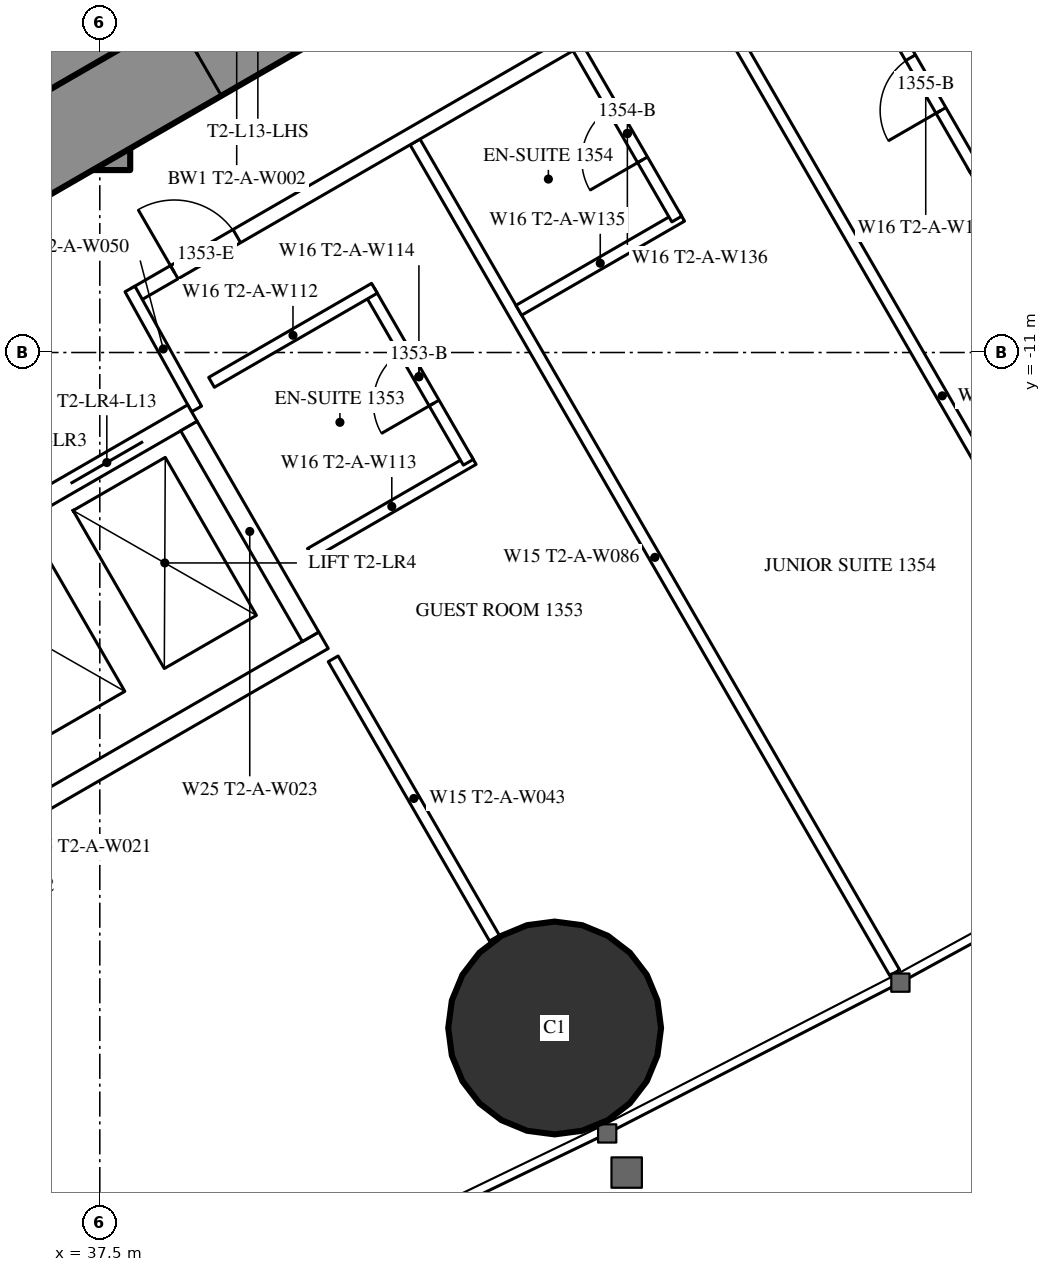
"""IFC4 building model, lengths in metres.
Left out: names, types, materials, properties, quantities, classifications, styles, units other than length and angle.
Written with IfcOpenShell. Run it as: python <this file> out.ifc"""

import sys

from ifc_helpers import new_model, si_unit, direction, frame, frame_2d, origin, origin_2d, place, context, subcontext, project, spatial, rectangle, hollow_circle, extrude, element, fill, save


model = new_model("IFC4")
c1 = context("Model", 3, precision=1e-05, world=origin(), true_north=direction((0.0, 1.0)))
c2 = subcontext(c1, "Body", "Model", "MODEL_VIEW")
j1 = project(units=[si_unit("LENGTHUNIT", "METRE"), si_unit("PLANEANGLEUNIT", "RADIAN")], contexts=[c1])
p1 = place(None, origin())
s1 = spatial("IfcSite", under=j1, at=p1, CompositionType="ELEMENT")
p2 = place(p1, origin())
s2 = spatial("IfcBuilding", under=s1, at=p2, CompositionType="ELEMENT")
p3 = place(p2, frame((0.0, 0.0, 53.0)))
s3 = spatial("IfcBuildingStorey", under=s2, at=p3, CompositionType="ELEMENT", Elevation=53.0)
p4 = place(p3, frame((43.484, -19.886, 0.0), z_axis=(0.0, 0.0, 1.0), x_axis=(1.0, 0.0, 0.0)))
e1 = element("IfcColumn", 1, at=p4, inside=s3, PredefinedType="COLUMN", context=c2, shape_type="SweptSolid", body=[
    extrude(hollow_circle(Radius=1.4, WallThickness=0.12, at=origin_2d()), origin(), (0.0, 0.0, 1.0), 3.5),
])
p5 = place(p3, frame((37.3, -8.6, 0.0), z_axis=(0.0, 0.0, 1.0), x_axis=(0.0, 1.0, 0.0)))
e2 = element("IfcWall", 2, at=p5, inside=s3, PredefinedType="SHEAR", context=c2, shape_type="SweptSolid", body=[
    extrude(rectangle(XDim=17.2, YDim=1.2, at=frame_2d((8.6, 0.0))), origin(), (0.0, 0.0, 1.0), 3.5),
])
p6 = place(p5, frame((7.7, 0.0, 0.0)))
e3 = element("IfcOpeningElement", 3, at=p6, cuts=e2, PredefinedType="OPENING", context=c2, shape_type="SweptSolid", body=[
    extrude(rectangle(XDim=1.8, YDim=2.2, at=frame_2d((0.9, 1.1))), frame((0.0, 0.61, 0.0), z_axis=(0.0, -1.0, 0.0), x_axis=(1.0, 0.0, 0.0)), (0.0, 0.0, 1.0), 1.22),
])
p7 = place(p3, frame((27.2, -13.8, 0.0), z_axis=(0.0, 0.0, 1.0), x_axis=(0.866027159892, 0.499996958321, 0.0)))
e4 = element("IfcWall", 4, at=p7, inside=s3, PredefinedType="SHEAR", context=c2, shape_type="SweptSolid", body=[
    extrude(rectangle(XDim=27.947, YDim=1.2, at=frame_2d((13.973, 0.0))), origin(), (0.0, 0.0, 1.0), 3.5),
])
p8 = place(p7, frame((4.6, 0.0, 0.0)))
e5 = element("IfcOpeningElement", 5, at=p8, cuts=e4, PredefinedType="OPENING", context=c2, shape_type="SweptSolid", body=[
    extrude(rectangle(XDim=1.0, YDim=2.2, at=frame_2d((0.5, 1.1))), frame((0.0, 0.61, 0.0), z_axis=(0.0, -1.0, 0.0), x_axis=(1.0, 0.0, 0.0)), (0.0, 0.0, 1.0), 1.22),
])
p9 = place(p7, frame((13.395, 0.0, 0.0)))
e6 = element("IfcOpeningElement", 6, at=p9, cuts=e4, PredefinedType="OPENING", context=c2, shape_type="SweptSolid", body=[
    extrude(rectangle(XDim=1.8, YDim=2.2, at=frame_2d((0.9, 1.1))), frame((0.0, 0.61, 0.0), z_axis=(0.0, -1.0, 0.0), x_axis=(1.0, 0.0, 0.0)), (0.0, 0.0, 1.0), 1.22),
])
p10 = place(p3, frame((41.647, -8.23, 0.0), z_axis=(0.0, 0.0, 1.0), x_axis=(0.49998590462, -0.866033541603, 0.0)))
e7 = element("IfcWall", 7, at=p10, inside=s3, PredefinedType="PARTITIONING", context=c2, shape_type="SweptSolid", body=[
    extrude(rectangle(XDim=12.621, YDim=0.15, at=frame_2d((6.311, 0.0))), origin(), (0.0, 0.0, 1.0), 3.25),
])
p11 = place(p3, frame((45.403, -6.062, 0.0), z_axis=(0.0, 0.0, 1.0), x_axis=(0.500007077968, -0.866021317279, 0.0)))
e8 = element("IfcWall", 8, at=p11, inside=s3, PredefinedType="PARTITIONING", context=c2, shape_type="SweptSolid", body=[
    extrude(rectangle(XDim=12.721, YDim=0.15, at=frame_2d((6.361, 0.0))), origin(), (0.0, 0.0, 1.0), 3.25),
])
p12 = place(p3, frame((40.57, -15.03, 0.0), z_axis=(0.0, 0.0, 1.0), x_axis=(0.500012993597, -0.866017901798, 0.0)))
e9 = element("IfcWall", 9, at=p12, inside=s3, PredefinedType="PARTITIONING", context=c2, shape_type="SweptSolid", body=[
    extrude(rectangle(XDim=4.243, YDim=0.15, at=frame_2d((2.122, 0.0))), origin(), (0.0, 0.0, 1.0), 3.25),
])
p13 = place(p3, frame((37.96, -10.243, 0.0), z_axis=(0.0, 0.0, 1.0), x_axis=(0.866026429433, 0.499998223521, 0.0)))
e10 = element("IfcWall", 10, at=p13, inside=s3, PredefinedType="PARTITIONING", context=c2, shape_type="SweptSolid", body=[
    extrude(rectangle(XDim=20.487, YDim=0.2, at=frame_2d((10.243, 0.0))), origin(), (0.0, 0.0, 1.0), 3.25),
])
p14 = place(p13, frame((6.925, 0.0, 0.0)))
e11 = element("IfcOpeningElement", 11, at=p14, cuts=e10, PredefinedType="OPENING", context=c2, shape_type="SweptSolid", body=[
    extrude(rectangle(XDim=0.95, YDim=2.2, at=frame_2d((0.475, 1.1))), frame((0.0, 0.11, 0.0), z_axis=(0.0, -1.0, 0.0), x_axis=(1.0, 0.0, 0.0)), (0.0, 0.0, 1.0), 0.22),
])
p15 = place(p13, frame((11.549, 0.0, 0.0)))
e12 = element("IfcOpeningElement", 12, at=p15, cuts=e10, PredefinedType="OPENING", context=c2, shape_type="SweptSolid", body=[
    extrude(rectangle(XDim=0.95, YDim=2.2, at=frame_2d((0.475, 1.1))), frame((0.0, 0.11, 0.0), z_axis=(0.0, -1.0, 0.0), x_axis=(1.0, 0.0, 0.0)), (0.0, 0.0, 1.0), 0.22),
])
p16 = place(p13, frame((13.249, 0.0, 0.0)))
e13 = element("IfcOpeningElement", 13, at=p16, cuts=e10, PredefinedType="OPENING", context=c2, shape_type="SweptSolid", body=[
    extrude(rectangle(XDim=0.95, YDim=2.2, at=frame_2d((0.475, 1.1))), frame((0.0, 0.11, 0.0), z_axis=(0.0, -1.0, 0.0), x_axis=(1.0, 0.0, 0.0)), (0.0, 0.0, 1.0), 0.22),
])
p17 = place(p13, frame((17.585, 0.0, 0.0)))
e14 = element("IfcOpeningElement", 14, at=p17, cuts=e10, PredefinedType="OPENING", context=c2, shape_type="SweptSolid", body=[
    extrude(rectangle(XDim=0.95, YDim=2.2, at=frame_2d((0.475, 1.1))), frame((0.0, 0.11, 0.0), z_axis=(0.0, -1.0, 0.0), x_axis=(1.0, 0.0, 0.0)), (0.0, 0.0, 1.0), 0.22),
])
p18 = place(p13, frame((0.6, 0.0, 0.0)))
e15 = element("IfcOpeningElement", 15, at=p18, cuts=e10, PredefinedType="OPENING", context=c2, shape_type="SweptSolid", body=[
    extrude(rectangle(XDim=0.95, YDim=2.2, at=frame_2d((0.475, 1.1))), frame((0.0, 0.11, 0.0), z_axis=(0.0, -1.0, 0.0), x_axis=(1.0, 0.0, 0.0)), (0.0, 0.0, 1.0), 0.22),
])
p19 = place(p3, frame((38.773, -11.742, 0.0), z_axis=(0.0, 0.0, 1.0), x_axis=(-0.485528096672, 0.8742210632, 0.0)))
e16 = element("IfcWall", 16, at=p19, inside=s3, PredefinedType="PARTITIONING", context=c2, shape_type="SweptSolid", body=[
    extrude(rectangle(XDim=1.805, YDim=0.15, at=frame_2d((0.903, 0.0))), origin(), (0.0, 0.0, 1.0), 3.25),
])
p20 = place(p3, frame((43.012, -10.444, 0.0), z_axis=(0.0, 0.0, 1.0), x_axis=(0.866031185235, 0.4999899861, 0.0)))
e17 = element("IfcWall", 17, at=p20, inside=s3, PredefinedType="PARTITIONING", context=c2, shape_type="SweptSolid", body=[
    extrude(rectangle(XDim=2.475, YDim=0.15, at=frame_2d((1.238, 0.0))), origin(), (0.0, 0.0, 1.0), 3.25),
])
p21 = place(p3, frame((43.791, -6.993, 0.0), z_axis=(0.0, 0.0, 1.0), x_axis=(0.500047596559, -0.865997922154, 0.0)))
e18 = element("IfcWall", 18, at=p21, inside=s3, PredefinedType="PARTITIONING", context=c2, shape_type="SweptSolid", body=[
    extrude(rectangle(XDim=2.6, YDim=0.15, at=frame_2d((1.3, 0.0))), origin(), (0.0, 0.0, 1.0), 3.25),
])
p22 = place(p21, frame((0.9, 0.0, 0.0)))
e19 = element("IfcOpeningElement", 19, at=p22, cuts=e18, PredefinedType="OPENING", context=c2, shape_type="SweptSolid", body=[
    extrude(rectangle(XDim=0.8, YDim=2.2, at=frame_2d((0.4, 1.1))), frame((0.0, 0.085, 0.0), z_axis=(0.0, -1.0, 0.0), x_axis=(1.0, 0.0, 0.0)), (0.0, 0.0, 1.0), 0.17),
])
p23 = place(p3, frame((48.951, -8.632, 0.0), z_axis=(0.0, 0.0, 1.0), x_axis=(0.866006523861, 0.500032699561, 0.0)))
e20 = element("IfcWall", 20, at=p23, inside=s3, PredefinedType="PARTITIONING", context=c2, shape_type="SweptSolid", body=[
    extrude(rectangle(XDim=2.475, YDim=0.15, at=frame_2d((1.237, 0.0))), origin(), (0.0, 0.0, 1.0), 3.25),
])
p24 = place(p3, frame((47.716, -6.343, 0.0), z_axis=(0.0, 0.0, 1.0), x_axis=(0.500006934395, -0.866021400173, 0.0)))
e21 = element("IfcWall", 21, at=p24, inside=s3, PredefinedType="PARTITIONING", context=c2, shape_type="SweptSolid", body=[
    extrude(rectangle(XDim=2.6, YDim=0.15, at=frame_2d((1.3, 0.0))), origin(), (0.0, 0.0, 1.0), 3.25),
])
p25 = place(p24, frame((0.9, 0.0, 0.0)))
e22 = element("IfcOpeningElement", 22, at=p25, cuts=e21, PredefinedType="OPENING", context=c2, shape_type="SweptSolid", body=[
    extrude(rectangle(XDim=0.8, YDim=2.2, at=frame_2d((0.4, 1.1))), frame((0.0, 0.085, 0.0), z_axis=(0.0, -1.0, 0.0), x_axis=(1.0, 0.0, 0.0)), (0.0, 0.0, 1.0), 0.17),
])
p26 = place(p3, frame((40.27, -13.644, 0.0), z_axis=(0.0, 0.0, 1.0), x_axis=(0.866031185235, 0.4999899861, 0.0)))
e23 = element("IfcWall", 23, at=p26, inside=s3, PredefinedType="PARTITIONING", context=c2, shape_type="SweptSolid", body=[
    extrude(rectangle(XDim=2.475, YDim=0.15, at=frame_2d((1.238, 0.0))), origin(), (0.0, 0.0, 1.0), 3.25),
])
p27 = place(p3, frame((41.048, -10.193, 0.0), z_axis=(0.0, 0.0, 1.0), x_axis=(0.500047596559, -0.865997922154, 0.0)))
e24 = element("IfcWall", 24, at=p27, inside=s3, PredefinedType="PARTITIONING", context=c2, shape_type="SweptSolid", body=[
    extrude(rectangle(XDim=2.6, YDim=0.15, at=frame_2d((1.3, 0.0))), origin(), (0.0, 0.0, 1.0), 3.25),
])
p28 = place(p27, frame((0.9, 0.0, 0.0)))
e25 = element("IfcOpeningElement", 25, at=p28, cuts=e24, PredefinedType="OPENING", context=c2, shape_type="SweptSolid", body=[
    extrude(rectangle(XDim=0.8, YDim=2.2, at=frame_2d((0.4, 1.1))), frame((0.0, 0.085, 0.0), z_axis=(0.0, -1.0, 0.0), x_axis=(1.0, 0.0, 0.0)), (0.0, 0.0, 1.0), 0.17),
])
p29 = place(p3, frame((38.97, -11.393, 0.0), z_axis=(0.0, 0.0, 1.0), x_axis=(0.866031185235, 0.4999899861, 0.0)))
e26 = element("IfcWall", 26, at=p29, inside=s3, PredefinedType="PARTITIONING", context=c2, shape_type="SweptSolid", body=[
    extrude(rectangle(XDim=2.475, YDim=0.15, at=frame_2d((1.238, 0.0))), origin(), (0.0, 0.0, 1.0), 3.25),
])
p30 = place(p3, frame((31.271, -16.097, 0.0), z_axis=(0.0, 0.0, 1.0), x_axis=(0.86604045752, 0.499973925258, 0.0)))
e27 = element("IfcWall", 27, at=p30, inside=s3, PredefinedType="PARTITIONING", context=c2, shape_type="SweptSolid", body=[
    extrude(rectangle(XDim=8.6, YDim=0.25, at=frame_2d((4.3, 0.0))), origin(), (0.0, 0.0, 1.0), 3.25),
])
p31 = place(p30, frame((0.75, 0.0, 0.0)))
e28 = element("IfcOpeningElement", 28, at=p31, cuts=e27, PredefinedType="OPENING", context=c2, shape_type="SweptSolid", body=[
    extrude(rectangle(XDim=1.1, YDim=2.2, at=frame_2d((0.55, 1.1))), frame((0.0, 0.135, 0.0), z_axis=(0.0, -1.0, 0.0), x_axis=(1.0, 0.0, 0.0)), (0.0, 0.0, 1.0), 0.27),
])
p32 = place(p30, frame((2.75, 0.0, 0.0)))
e29 = element("IfcOpeningElement", 29, at=p32, cuts=e27, PredefinedType="OPENING", context=c2, shape_type="SweptSolid", body=[
    extrude(rectangle(XDim=1.1, YDim=2.2, at=frame_2d((0.55, 1.1))), frame((0.0, 0.135, 0.0), z_axis=(0.0, -1.0, 0.0), x_axis=(1.0, 0.0, 0.0)), (0.0, 0.0, 1.0), 0.27),
])
p33 = place(p30, frame((4.75, 0.0, 0.0)))
e30 = element("IfcOpeningElement", 30, at=p33, cuts=e27, PredefinedType="OPENING", context=c2, shape_type="SweptSolid", body=[
    extrude(rectangle(XDim=1.1, YDim=2.2, at=frame_2d((0.55, 1.1))), frame((0.0, 0.135, 0.0), z_axis=(0.0, -1.0, 0.0), x_axis=(1.0, 0.0, 0.0)), (0.0, 0.0, 1.0), 0.27),
])
p34 = place(p30, frame((6.75, 0.0, 0.0)))
e31 = element("IfcOpeningElement", 31, at=p34, cuts=e27, PredefinedType="OPENING", context=c2, shape_type="SweptSolid", body=[
    extrude(rectangle(XDim=1.1, YDim=2.2, at=frame_2d((0.55, 1.1))), frame((0.0, 0.135, 0.0), z_axis=(0.0, -1.0, 0.0), x_axis=(1.0, 0.0, 0.0)), (0.0, 0.0, 1.0), 0.27),
])
p35 = place(p3, frame((32.996, -19.086, 0.0), z_axis=(0.0, 0.0, 1.0), x_axis=(0.866028165386, 0.499995216735, 0.0)))
e32 = element("IfcWall", 32, at=p35, inside=s3, PredefinedType="PARTITIONING", context=c2, shape_type="SweptSolid", body=[
    extrude(rectangle(XDim=8.6, YDim=0.25, at=frame_2d((4.3, 0.0))), origin(), (0.0, 0.0, 1.0), 3.25),
])
p36 = place(p3, frame((38.673, -11.968, 0.0), z_axis=(0.0, 0.0, 1.0), x_axis=(0.499929347863, -0.866066190972, 0.0)))
e33 = element("IfcWall", 33, at=p36, inside=s3, PredefinedType="PARTITIONING", context=c2, shape_type="SweptSolid", body=[
    extrude(rectangle(XDim=3.201, YDim=0.25, at=frame_2d((1.6, 0.0))), origin(), (0.0, 0.0, 1.0), 3.25),
])
p37 = place(p22, origin())
e34 = element("IfcDoor", 34, at=p37, inside=s3, OperationType="SINGLE_SWING_RIGHT", PredefinedType="DOOR", context=c2, shape_type="SweptSolid", body=[
    extrude(rectangle(XDim=0.8, YDim=2.2, at=frame_2d((0.4, 1.1))), frame((0.0, 0.025, 0.0), z_axis=(0.0, -1.0, 0.0), x_axis=(1.0, 0.0, 0.0)), (0.0, 0.0, 1.0), 0.05),
])
fill(e19, e34)
p38 = place(p25, origin())
e35 = element("IfcDoor", 35, at=p38, inside=s3, OperationType="SINGLE_SWING_RIGHT", PredefinedType="DOOR", context=c2, shape_type="SweptSolid", body=[
    extrude(rectangle(XDim=0.8, YDim=2.2, at=frame_2d((0.4, 1.1))), frame((0.0, 0.025, 0.0), z_axis=(0.0, -1.0, 0.0), x_axis=(1.0, 0.0, 0.0)), (0.0, 0.0, 1.0), 0.05),
])
fill(e22, e35)
p39 = place(p28, origin())
e36 = element("IfcDoor", 36, at=p39, inside=s3, OperationType="SINGLE_SWING_RIGHT", PredefinedType="DOOR", context=c2, shape_type="SweptSolid", body=[
    extrude(rectangle(XDim=0.8, YDim=2.2, at=frame_2d((0.4, 1.1))), frame((0.0, 0.025, 0.0), z_axis=(0.0, -1.0, 0.0), x_axis=(1.0, 0.0, 0.0)), (0.0, 0.0, 1.0), 0.05),
])
fill(e25, e36)
p40 = place(p18, origin())
e37 = element("IfcDoor", 37, at=p40, inside=s3, OperationType="SINGLE_SWING_LEFT", PredefinedType="DOOR", context=c2, shape_type="SweptSolid", body=[
    extrude(rectangle(XDim=0.95, YDim=2.2, at=frame_2d((0.475, 1.1))), frame((0.0, 0.025, 0.0), z_axis=(0.0, -1.0, 0.0), x_axis=(1.0, 0.0, 0.0)), (0.0, 0.0, 1.0), 0.05),
])
fill(e15, e37)
p41 = place(p9, origin())
e38 = element("IfcDoor", 38, at=p41, inside=s3, OperationType="DOUBLE_DOOR_SINGLE_SWING", PredefinedType="DOOR", context=c2, shape_type="SweptSolid", body=[
    extrude(rectangle(XDim=1.8, YDim=2.2, at=frame_2d((0.9, 1.1))), frame((0.0, 0.025, 0.0), z_axis=(0.0, -1.0, 0.0), x_axis=(1.0, 0.0, 0.0)), (0.0, 0.0, 1.0), 0.05),
])
fill(e6, e38)
p42 = place(p34, origin())
e39 = element("IfcDoor", 39, at=p42, inside=s3, OperationType="DOUBLE_DOOR_SLIDING", PredefinedType="USERDEFINED", context=c2, shape_type="SweptSolid", body=[
    extrude(rectangle(XDim=1.1, YDim=2.2, at=frame_2d((0.55, 1.1))), frame((0.0, 0.025, 0.0), z_axis=(0.0, -1.0, 0.0), x_axis=(1.0, 0.0, 0.0)), (0.0, 0.0, 1.0), 0.05),
])
fill(e31, e39)
save(model, sys.argv[1])
